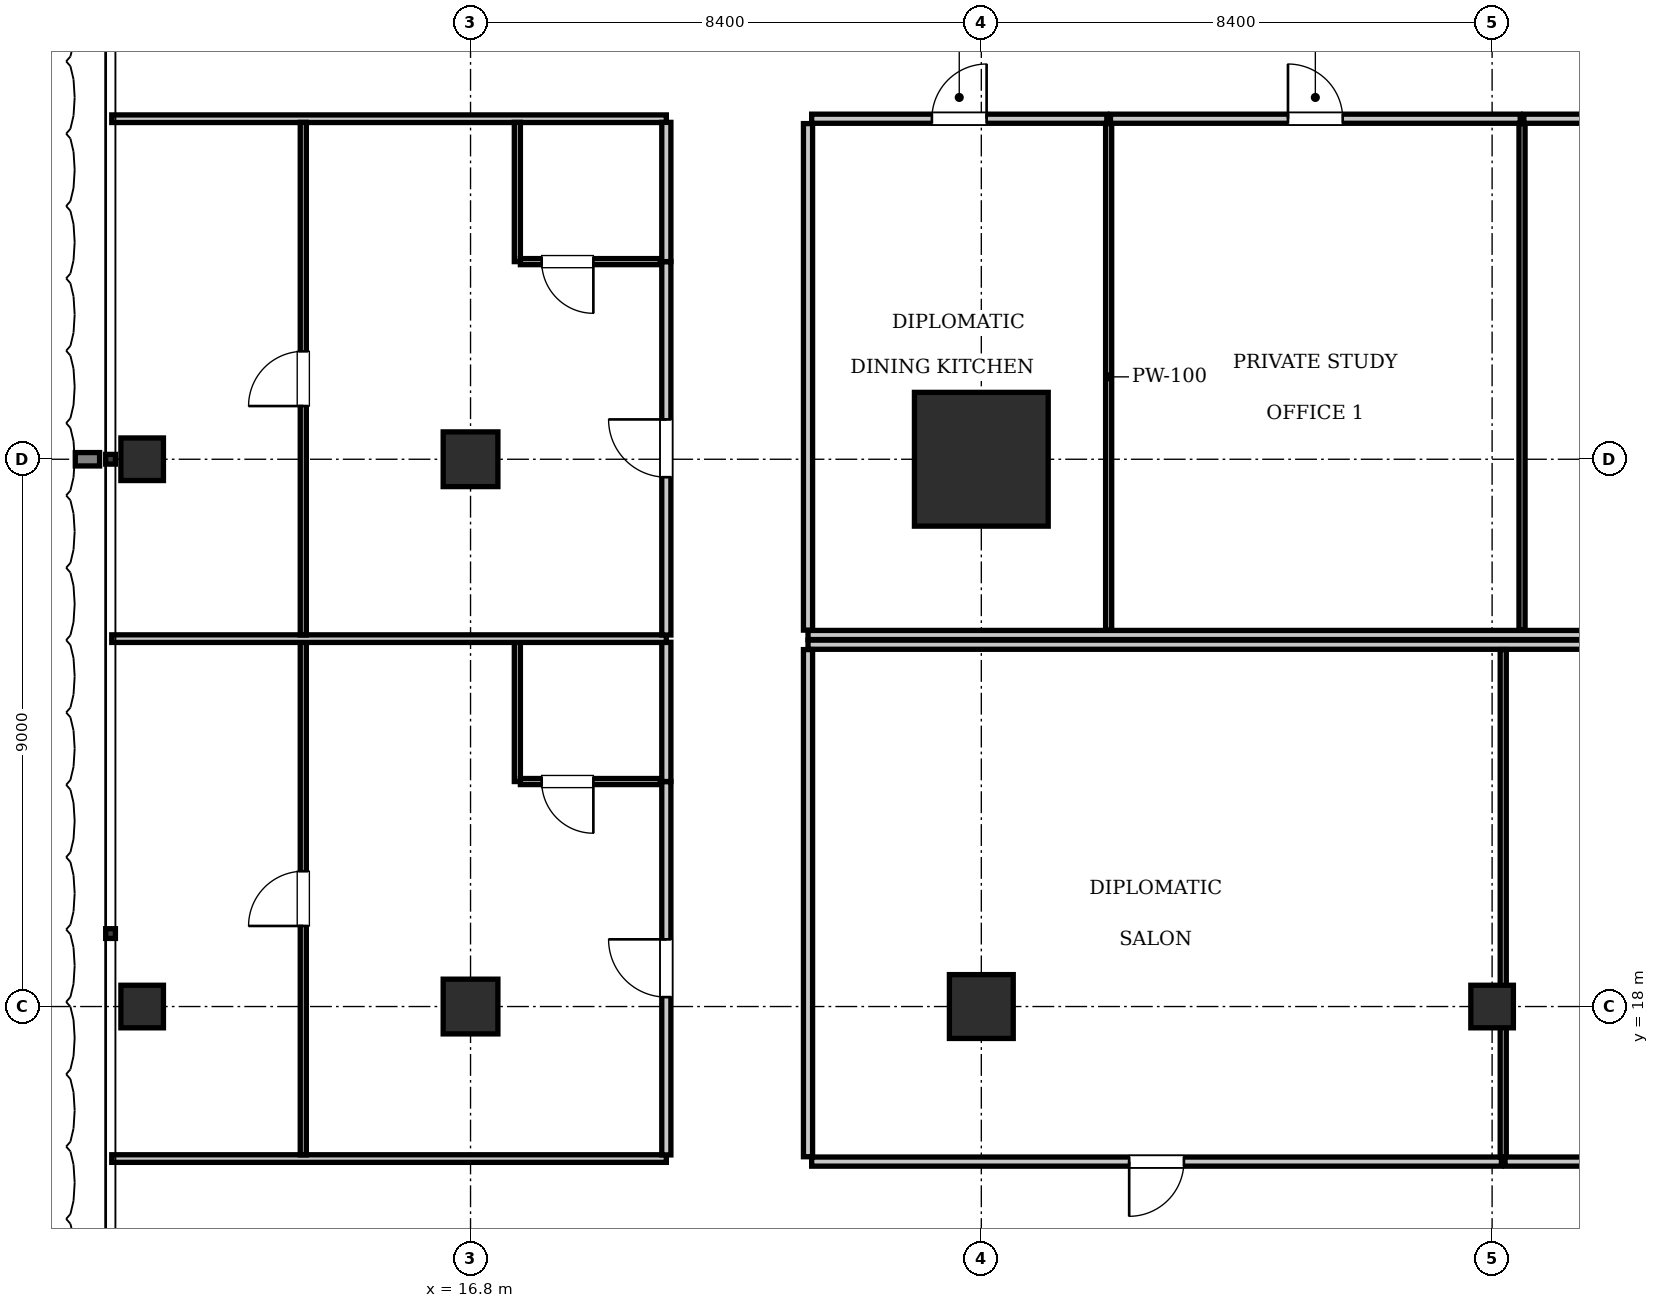
"""IFC4 building model, lengths in metres.
Left out: names, types, materials, properties, quantities, classifications, styles, units other than length and angle.
Written with IfcOpenShell. Run it as: python <this file> out.ifc"""

import sys

from ifc_helpers import new_model, si_unit, direction, frame, frame_2d, origin, origin_2d, place, context, subcontext, project, spatial, rectangle, i_section, extrude, element, fill, save


model = new_model("IFC4")
c1 = context("Model", 3, precision=1e-05, world=origin(), true_north=direction((0.0, 1.0)))
c2 = subcontext(c1, "Body", "Model", "MODEL_VIEW")
j1 = project(units=[si_unit("LENGTHUNIT", "METRE"), si_unit("PLANEANGLEUNIT", "RADIAN")], contexts=[c1])
p1 = place(None, origin())
s1 = spatial("IfcSite", under=j1, at=p1, CompositionType="ELEMENT")
p2 = place(p1, origin())
s2 = spatial("IfcBuilding", under=s1, at=p2, CompositionType="ELEMENT")
p3 = place(p2, frame((0.0, 0.0, 73.15)))
s3 = spatial("IfcBuildingStorey", under=s2, at=p3, CompositionType="ELEMENT", Elevation=73.15)
p4 = place(p3, frame((25.2, 27.0, 0.0), z_axis=(0.0, 0.0, 1.0), x_axis=(1.0, 0.0, 0.0)))
e1 = element("IfcColumn", 1, at=p4, inside=s3, PredefinedType="COLUMN", context=c2, shape_type="SweptSolid", body=[
    extrude(rectangle(XDim=2.2, YDim=2.2, at=origin_2d()), origin(), (0.0, 0.0, 1.0), 3.85),
])
p5 = place(p3, frame((25.2, 18.0, 0.0), z_axis=(0.0, 0.0, 1.0), x_axis=(1.0, 0.0, 0.0)))
e2 = element("IfcColumn", 2, at=p5, inside=s3, PredefinedType="COLUMN", context=c2, shape_type="SweptSolid", body=[
    extrude(rectangle(XDim=1.05, YDim=1.05, at=origin_2d()), origin(), (0.0, 0.0, 1.0), 3.85),
])
p6 = place(p3, frame((33.6, 18.0, 0.0), z_axis=(0.0, 0.0, 1.0), x_axis=(1.0, 0.0, 0.0)))
e3 = element("IfcColumn", 3, at=p6, inside=s3, PredefinedType="COLUMN", context=c2, shape_type="SweptSolid", body=[
    extrude(i_section(OverallWidth=0.7, OverallDepth=0.7, WebThickness=0.028, FlangeThickness=0.044, at=origin_2d()), origin(), (0.0, 0.0, 1.0), 3.85),
])
for number, where, z_axis, x_axis in (
    (4, (16.8, 18.0, 0.0), (0.0, 0.0, 1.0), (1.0, 0.0, 0.0)),
    (5, (16.8, 27.0, 0.0), (0.0, 0.0, 1.0), (1.0, 0.0, 0.0)),
):
    element("IfcColumn", number, at=place(p3, frame(where, z_axis=z_axis, x_axis=x_axis)), inside=s3, PredefinedType="COLUMN", context=c2, shape_type="SweptSolid", body=[
        extrude(rectangle(XDim=0.9, YDim=0.9, at=origin_2d()), origin(), (0.0, 0.0, 1.0), 3.85),
    ])
for number, where, z_axis, x_axis in (
    (6, (11.4, 18.0, 0.0), (0.0, 0.0, 1.0), (1.0, 0.0, 0.0)),
    (7, (11.4, 27.0, 0.0), (0.0, 0.0, 1.0), (1.0, 0.0, 0.0)),
):
    element("IfcColumn", number, at=place(p3, frame(where, z_axis=z_axis, x_axis=x_axis)), inside=s3, PredefinedType="COLUMN", context=c2, shape_type="SweptSolid", body=[
        extrude(i_section(OverallWidth=0.7, OverallDepth=0.7, WebThickness=0.028, FlangeThickness=0.044, at=origin_2d()), origin(), (0.0, 0.0, 1.0), 3.85),
    ])
p7 = place(p3, frame((22.35, 24.11, 0.0), z_axis=(0.0, 0.0, 1.0), x_axis=(1.0, 0.0, 0.0)))
e8 = element("IfcWall", 8, at=p7, inside=s3, PredefinedType="PARTITIONING", context=c2, shape_type="SweptSolid", body=[
    extrude(rectangle(XDim=30.9, YDim=0.15, at=frame_2d((15.45, 0.0))), origin(), (0.0, 0.0, 1.0), 3.61),
])
p8 = place(p3, frame((22.35, 24.19, 0.0), z_axis=(0.0, 0.0, 1.0), x_axis=(0.0, 1.0, 0.0)))
e9 = element("IfcWall", 9, at=p8, inside=s3, PredefinedType="PARTITIONING", context=c2, shape_type="SweptSolid", body=[
    extrude(rectangle(XDim=8.33, YDim=0.15, at=frame_2d((4.165, 0.0))), origin(), (0.0, 0.0, 1.0), 3.61),
])
p9 = place(p3, frame((22.41, 32.6, 0.0), z_axis=(0.0, 0.0, 1.0), x_axis=(1.0, 0.0, 0.0)))
e10 = element("IfcWall", 10, at=p9, inside=s3, PredefinedType="PARTITIONING", context=c2, shape_type="SweptSolid", body=[
    extrude(rectangle(XDim=4.854, YDim=0.15, at=frame_2d((2.427, 0.0))), origin(), (0.0, 0.0, 1.0), 3.61),
])
p10 = place(p9, frame((1.977, 0.0, 0.0)))
e11 = element("IfcOpeningElement", 11, at=p10, cuts=e10, PredefinedType="OPENING", context=c2, shape_type="SweptSolid", body=[
    extrude(rectangle(XDim=0.9, YDim=2.1, at=frame_2d((0.45, 1.05))), frame((0.0, 0.085, 0.0), z_axis=(0.0, -1.0, 0.0), x_axis=(1.0, 0.0, 0.0)), (0.0, 0.0, 1.0), 0.17),
])
p11 = place(p3, frame((27.294, 24.19, 0.0), z_axis=(0.0, 0.0, 1.0), x_axis=(0.0, 1.0, 0.0)))
e12 = element("IfcWall", 12, at=p11, inside=s3, PredefinedType="PARTITIONING", context=c2, shape_type="SweptSolid", body=[
    extrude(rectangle(XDim=8.33, YDim=0.1, at=frame_2d((4.165, 0.0))), origin(), (0.0, 0.0, 1.0), 3.61),
])
p12 = place(p3, frame((27.324, 32.6, 0.0), z_axis=(0.0, 0.0, 1.0), x_axis=(1.0, 0.0, 0.0)))
e13 = element("IfcWall", 13, at=p12, inside=s3, PredefinedType="PARTITIONING", context=c2, shape_type="SweptSolid", body=[
    extrude(rectangle(XDim=6.738, YDim=0.15, at=frame_2d((3.369, 0.0))), origin(), (0.0, 0.0, 1.0), 3.61),
])
p13 = place(p12, frame((2.919, 0.0, 0.0)))
e14 = element("IfcOpeningElement", 14, at=p13, cuts=e13, PredefinedType="OPENING", context=c2, shape_type="SweptSolid", body=[
    extrude(rectangle(XDim=0.9, YDim=2.1, at=frame_2d((0.45, 1.05))), frame((0.0, 0.085, 0.0), z_axis=(0.0, -1.0, 0.0), x_axis=(1.0, 0.0, 0.0)), (0.0, 0.0, 1.0), 0.17),
])
p14 = place(p3, frame((34.092, 24.19, 0.0), z_axis=(0.0, 0.0, 1.0), x_axis=(0.0, 1.0, 0.0)))
e15 = element("IfcWall", 15, at=p14, inside=s3, PredefinedType="PARTITIONING", context=c2, shape_type="SweptSolid", body=[
    extrude(rectangle(XDim=8.33, YDim=0.1, at=frame_2d((4.165, 0.0))), origin(), (0.0, 0.0, 1.0), 3.61),
])
p15 = place(p3, frame((34.122, 32.6, 0.0), z_axis=(0.0, 0.0, 1.0), x_axis=(1.0, 0.0, 0.0)))
e16 = element("IfcWall", 16, at=p15, inside=s3, PredefinedType="PARTITIONING", context=c2, shape_type="SweptSolid", body=[
    extrude(rectangle(XDim=8.592, YDim=0.15, at=frame_2d((4.296, 0.0))), origin(), (0.0, 0.0, 1.0), 3.61),
])
p16 = place(p15, frame((3.846, 0.0, 0.0)))
e17 = element("IfcOpeningElement", 17, at=p16, cuts=e16, PredefinedType="OPENING", context=c2, shape_type="SweptSolid", body=[
    extrude(rectangle(XDim=0.9, YDim=2.1, at=frame_2d((0.45, 1.05))), frame((0.0, 0.085, 0.0), z_axis=(0.0, -1.0, 0.0), x_axis=(1.0, 0.0, 0.0)), (0.0, 0.0, 1.0), 0.17),
])
p17 = place(p3, frame((22.35, 23.95, 0.0), z_axis=(0.0, 0.0, 1.0), x_axis=(1.0, 0.0, 0.0)))
e18 = element("IfcWall", 18, at=p17, inside=s3, PredefinedType="PARTITIONING", context=c2, shape_type="SweptSolid", body=[
    extrude(rectangle(XDim=30.9, YDim=0.15, at=frame_2d((15.45, 0.0))), origin(), (0.0, 0.0, 1.0), 3.61),
])
p18 = place(p3, frame((22.35, 15.53, 0.0), z_axis=(0.0, 0.0, 1.0), x_axis=(0.0, 1.0, 0.0)))
e19 = element("IfcWall", 19, at=p18, inside=s3, PredefinedType="PARTITIONING", context=c2, shape_type="SweptSolid", body=[
    extrude(rectangle(XDim=8.34, YDim=0.15, at=frame_2d((4.17, 0.0))), origin(), (0.0, 0.0, 1.0), 3.61),
])
p19 = place(p3, frame((22.41, 15.45, 0.0), z_axis=(0.0, 0.0, 1.0), x_axis=(1.0, 0.0, 0.0)))
e20 = element("IfcWall", 20, at=p19, inside=s3, PredefinedType="PARTITIONING", context=c2, shape_type="SweptSolid", body=[
    extrude(rectangle(XDim=11.343, YDim=0.15, at=frame_2d((5.671, 0.0))), origin(), (0.0, 0.0, 1.0), 3.61),
])
p20 = place(p19, frame((5.221, 0.0, 0.0)))
e21 = element("IfcOpeningElement", 21, at=p20, cuts=e20, PredefinedType="OPENING", context=c2, shape_type="SweptSolid", body=[
    extrude(rectangle(XDim=0.9, YDim=2.1, at=frame_2d((0.45, 1.05))), frame((0.0, 0.085, 0.0), z_axis=(0.0, -1.0, 0.0), x_axis=(1.0, 0.0, 0.0)), (0.0, 0.0, 1.0), 0.17),
])
p21 = place(p3, frame((33.783, 15.53, 0.0), z_axis=(0.0, 0.0, 1.0), x_axis=(0.0, 1.0, 0.0)))
e22 = element("IfcWall", 22, at=p21, inside=s3, PredefinedType="PARTITIONING", context=c2, shape_type="SweptSolid", body=[
    extrude(rectangle(XDim=8.34, YDim=0.1, at=frame_2d((4.17, 0.0))), origin(), (0.0, 0.0, 1.0), 2.999),
])
p22 = place(p3, frame((33.813, 15.45, 0.0), z_axis=(0.0, 0.0, 1.0), x_axis=(1.0, 0.0, 0.0)))
e23 = element("IfcWall", 23, at=p22, inside=s3, PredefinedType="PARTITIONING", context=c2, shape_type="SweptSolid", body=[
    extrude(rectangle(XDim=19.377, YDim=0.15, at=frame_2d((9.688, 0.0))), origin(), (0.0, 0.0, 1.0), 3.61),
])
p23 = place(p22, frame((9.239, 0.0, 0.0)))
e24 = element("IfcOpeningElement", 24, at=p23, cuts=e23, PredefinedType="OPENING", context=c2, shape_type="SweptSolid", body=[
    extrude(rectangle(XDim=0.9, YDim=2.1, at=frame_2d((0.45, 1.05))), frame((0.0, 0.085, 0.0), z_axis=(0.0, -1.0, 0.0), x_axis=(1.0, 0.0, 0.0)), (0.0, 0.0, 1.0), 0.17),
])
for number, where, z_axis, x_axis in (
    (25, (10.9, 15.5, 0.0), (0.0, 0.0, 1.0), (1.0, 0.0, 0.0)),
    (26, (10.9, 32.6, 0.0), (0.0, 0.0, 1.0), (1.0, 0.0, 0.0)),
):
    element("IfcWall", number, at=place(p3, frame(where, z_axis=z_axis, x_axis=x_axis)), inside=s3, PredefinedType="PARTITIONING", context=c2, shape_type="SweptSolid", body=[
        extrude(rectangle(XDim=9.12, YDim=0.125, at=frame_2d((4.56, 0.0))), origin(), (0.0, 0.0, 1.0), 3.61),
    ])
p24 = place(p3, frame((20.02, 15.56, 0.0), z_axis=(0.0, 0.0, 1.0), x_axis=(0.0, 1.0, 0.0)))
e27 = element("IfcWall", 27, at=p24, inside=s3, PredefinedType="PARTITIONING", context=c2, shape_type="SweptSolid", body=[
    extrude(rectangle(XDim=6.14, YDim=0.15, at=frame_2d((3.07, 0.0))), origin(), (0.0, 0.0, 1.0), 3.61),
])
p25 = place(p24, frame((2.595, 0.0, 0.0)))
e28 = element("IfcOpeningElement", 28, at=p25, cuts=e27, PredefinedType="OPENING", context=c2, shape_type="SweptSolid", body=[
    extrude(rectangle(XDim=0.95, YDim=2.15, at=frame_2d((0.475, 1.075))), frame((0.0, 0.085, 0.0), z_axis=(0.0, -1.0, 0.0), x_axis=(1.0, 0.0, 0.0)), (0.0, 0.0, 1.0), 0.17),
])
p26 = place(p3, frame((20.02, 21.7, 0.0), z_axis=(0.0, 0.0, 1.0), x_axis=(0.0, 1.0, 0.0)))
e29 = element("IfcWall", 29, at=p26, inside=s3, PredefinedType="PARTITIONING", context=c2, shape_type="SweptSolid", body=[
    extrude(rectangle(XDim=2.29, YDim=0.15, at=frame_2d((1.145, 0.0))), origin(), (0.0, 0.0, 1.0), 3.61),
])
p27 = place(p3, frame((17.57, 21.7, 0.0), z_axis=(0.0, 0.0, 1.0), x_axis=(0.0, 1.0, 0.0)))
e30 = element("IfcWall", 30, at=p27, inside=s3, PredefinedType="PARTITIONING", context=c2, shape_type="SweptSolid", body=[
    extrude(rectangle(XDim=2.29, YDim=0.1, at=frame_2d((1.145, 0.0))), origin(), (0.0, 0.0, 1.0), 3.61),
])
p28 = place(p3, frame((17.62, 21.7, 0.0), z_axis=(0.0, 0.0, 1.0), x_axis=(1.0, 0.0, 0.0)))
e31 = element("IfcWall", 31, at=p28, inside=s3, PredefinedType="PARTITIONING", context=c2, shape_type="SweptSolid", body=[
    extrude(rectangle(XDim=2.3, YDim=0.1, at=frame_2d((1.15, 0.0))), origin(), (0.0, 0.0, 1.0), 3.61),
])
p29 = place(p28, frame((0.35, 0.0, 0.0)))
e32 = element("IfcOpeningElement", 32, at=p29, cuts=e31, PredefinedType="OPENING", context=c2, shape_type="SweptSolid", body=[
    extrude(rectangle(XDim=0.85, YDim=2.1, at=frame_2d((0.425, 1.05))), frame((0.0, 0.06, 0.0), z_axis=(0.0, -1.0, 0.0), x_axis=(1.0, 0.0, 0.0)), (0.0, 0.0, 1.0), 0.12),
])
p30 = place(p3, frame((14.05, 15.56, 0.0), z_axis=(0.0, 0.0, 1.0), x_axis=(0.0, 1.0, 0.0)))
e33 = element("IfcWall", 33, at=p30, inside=s3, PredefinedType="PARTITIONING", context=c2, shape_type="SweptSolid", body=[
    extrude(rectangle(XDim=8.43, YDim=0.1, at=frame_2d((4.215, 0.0))), origin(), (0.0, 0.0, 1.0), 3.207),
])
p31 = place(p30, frame((3.765, 0.0, 0.0)))
e34 = element("IfcOpeningElement", 34, at=p31, cuts=e33, PredefinedType="OPENING", context=c2, shape_type="SweptSolid", body=[
    extrude(rectangle(XDim=0.9, YDim=2.1, at=frame_2d((0.45, 1.05))), frame((0.0, 0.06, 0.0), z_axis=(0.0, -1.0, 0.0), x_axis=(1.0, 0.0, 0.0)), (0.0, 0.0, 1.0), 0.12),
])
p32 = place(p3, frame((10.9, 24.05, 0.0), z_axis=(0.0, 0.0, 1.0), x_axis=(1.0, 0.0, 0.0)))
e35 = element("IfcWall", 35, at=p32, inside=s3, PredefinedType="PARTITIONING", context=c2, shape_type="SweptSolid", body=[
    extrude(rectangle(XDim=9.12, YDim=0.125, at=frame_2d((4.56, 0.0))), origin(), (0.0, 0.0, 1.0), 3.61),
])
p33 = place(p3, frame((20.02, 24.11, 0.0), z_axis=(0.0, 0.0, 1.0), x_axis=(0.0, 1.0, 0.0)))
e36 = element("IfcWall", 36, at=p33, inside=s3, PredefinedType="PARTITIONING", context=c2, shape_type="SweptSolid", body=[
    extrude(rectangle(XDim=6.14, YDim=0.15, at=frame_2d((3.07, 0.0))), origin(), (0.0, 0.0, 1.0), 3.61),
])
p34 = place(p33, frame((2.595, 0.0, 0.0)))
e37 = element("IfcOpeningElement", 37, at=p34, cuts=e36, PredefinedType="OPENING", context=c2, shape_type="SweptSolid", body=[
    extrude(rectangle(XDim=0.95, YDim=2.15, at=frame_2d((0.475, 1.075))), frame((0.0, 0.085, 0.0), z_axis=(0.0, -1.0, 0.0), x_axis=(1.0, 0.0, 0.0)), (0.0, 0.0, 1.0), 0.17),
])
p35 = place(p3, frame((20.02, 30.25, 0.0), z_axis=(0.0, 0.0, 1.0), x_axis=(0.0, 1.0, 0.0)))
e38 = element("IfcWall", 38, at=p35, inside=s3, PredefinedType="PARTITIONING", context=c2, shape_type="SweptSolid", body=[
    extrude(rectangle(XDim=2.29, YDim=0.15, at=frame_2d((1.145, 0.0))), origin(), (0.0, 0.0, 1.0), 3.61),
])
p36 = place(p3, frame((17.57, 30.25, 0.0), z_axis=(0.0, 0.0, 1.0), x_axis=(0.0, 1.0, 0.0)))
e39 = element("IfcWall", 39, at=p36, inside=s3, PredefinedType="PARTITIONING", context=c2, shape_type="SweptSolid", body=[
    extrude(rectangle(XDim=2.29, YDim=0.1, at=frame_2d((1.145, 0.0))), origin(), (0.0, 0.0, 1.0), 3.61),
])
p37 = place(p3, frame((17.62, 30.25, 0.0), z_axis=(0.0, 0.0, 1.0), x_axis=(1.0, 0.0, 0.0)))
e40 = element("IfcWall", 40, at=p37, inside=s3, PredefinedType="PARTITIONING", context=c2, shape_type="SweptSolid", body=[
    extrude(rectangle(XDim=2.3, YDim=0.1, at=frame_2d((1.15, 0.0))), origin(), (0.0, 0.0, 1.0), 3.61),
])
p38 = place(p37, frame((0.35, 0.0, 0.0)))
e41 = element("IfcOpeningElement", 41, at=p38, cuts=e40, PredefinedType="OPENING", context=c2, shape_type="SweptSolid", body=[
    extrude(rectangle(XDim=0.85, YDim=2.1, at=frame_2d((0.425, 1.05))), frame((0.0, 0.06, 0.0), z_axis=(0.0, -1.0, 0.0), x_axis=(1.0, 0.0, 0.0)), (0.0, 0.0, 1.0), 0.12),
])
p39 = place(p3, frame((14.05, 24.11, 0.0), z_axis=(0.0, 0.0, 1.0), x_axis=(0.0, 1.0, 0.0)))
e42 = element("IfcWall", 42, at=p39, inside=s3, PredefinedType="PARTITIONING", context=c2, shape_type="SweptSolid", body=[
    extrude(rectangle(XDim=8.43, YDim=0.1, at=frame_2d((4.215, 0.0))), origin(), (0.0, 0.0, 1.0), 3.207),
])
p40 = place(p39, frame((3.765, 0.0, 0.0)))
e43 = element("IfcOpeningElement", 43, at=p40, cuts=e42, PredefinedType="OPENING", context=c2, shape_type="SweptSolid", body=[
    extrude(rectangle(XDim=0.9, YDim=2.1, at=frame_2d((0.45, 1.05))), frame((0.0, 0.06, 0.0), z_axis=(0.0, -1.0, 0.0), x_axis=(1.0, 0.0, 0.0)), (0.0, 0.0, 1.0), 0.12),
])
p41 = place(p10, origin())
e44 = element("IfcDoor", 44, at=p41, inside=s3, OperationType="SINGLE_SWING_RIGHT", PredefinedType="DOOR", context=c2, shape_type="SweptSolid", body=[
    extrude(rectangle(XDim=0.9, YDim=2.1, at=frame_2d((0.45, 1.05))), frame((0.0, 0.025, 0.0), z_axis=(0.0, -1.0, 0.0), x_axis=(1.0, 0.0, 0.0)), (0.0, 0.0, 1.0), 0.05),
])
fill(e11, e44)
p42 = place(p13, origin())
e45 = element("IfcDoor", 45, at=p42, inside=s3, OperationType="SINGLE_SWING_LEFT", PredefinedType="DOOR", context=c2, shape_type="SweptSolid", body=[
    extrude(rectangle(XDim=0.9, YDim=2.1, at=frame_2d((0.45, 1.05))), frame((0.0, 0.025, 0.0), z_axis=(0.0, -1.0, 0.0), x_axis=(1.0, 0.0, 0.0)), (0.0, 0.0, 1.0), 0.05),
])
fill(e14, e45)
p43 = place(p20, frame((0.9, 0.0, 0.0), z_axis=(0.0, 0.0, 1.0), x_axis=(-1.0, 0.0, 0.0)))
e46 = element("IfcDoor", 46, at=p43, inside=s3, OperationType="SINGLE_SWING_RIGHT", PredefinedType="DOOR", context=c2, shape_type="SweptSolid", body=[
    extrude(rectangle(XDim=0.9, YDim=2.1, at=frame_2d((0.45, 1.05))), frame((0.0, 0.025, 0.0), z_axis=(0.0, -1.0, 0.0), x_axis=(1.0, 0.0, 0.0)), (0.0, 0.0, 1.0), 0.05),
])
fill(e21, e46)
p44 = place(p29, frame((0.85, 0.0, 0.0), z_axis=(0.0, 0.0, 1.0), x_axis=(-1.0, 0.0, 0.0)))
e47 = element("IfcDoor", 47, at=p44, inside=s3, OperationType="SINGLE_SWING_LEFT", PredefinedType="DOOR", context=c2, shape_type="SweptSolid", body=[
    extrude(rectangle(XDim=0.85, YDim=2.1, at=frame_2d((0.425, 1.05))), frame((0.0, 0.025, 0.0), z_axis=(0.0, -1.0, 0.0), x_axis=(1.0, 0.0, 0.0)), (0.0, 0.0, 1.0), 0.05),
])
fill(e32, e47)
p45 = place(p25, origin())
e48 = element("IfcDoor", 48, at=p45, inside=s3, OperationType="SINGLE_SWING_RIGHT", PredefinedType="DOOR", context=c2, shape_type="SweptSolid", body=[
    extrude(rectangle(XDim=0.95, YDim=2.15, at=frame_2d((0.475, 1.075))), frame((0.0, 0.025, 0.0), z_axis=(0.0, -1.0, 0.0), x_axis=(1.0, 0.0, 0.0)), (0.0, 0.0, 1.0), 0.05),
])
fill(e28, e48)
p46 = place(p31, origin())
e49 = element("IfcDoor", 49, at=p46, inside=s3, OperationType="SINGLE_SWING_LEFT", PredefinedType="DOOR", context=c2, shape_type="SweptSolid", body=[
    extrude(rectangle(XDim=0.9, YDim=2.1, at=frame_2d((0.45, 1.05))), frame((0.0, 0.025, 0.0), z_axis=(0.0, -1.0, 0.0), x_axis=(1.0, 0.0, 0.0)), (0.0, 0.0, 1.0), 0.05),
])
fill(e34, e49)
p47 = place(p38, frame((0.85, 0.0, 0.0), z_axis=(0.0, 0.0, 1.0), x_axis=(-1.0, 0.0, 0.0)))
e50 = element("IfcDoor", 50, at=p47, inside=s3, OperationType="SINGLE_SWING_LEFT", PredefinedType="DOOR", context=c2, shape_type="SweptSolid", body=[
    extrude(rectangle(XDim=0.85, YDim=2.1, at=frame_2d((0.425, 1.05))), frame((0.0, 0.025, 0.0), z_axis=(0.0, -1.0, 0.0), x_axis=(1.0, 0.0, 0.0)), (0.0, 0.0, 1.0), 0.05),
])
fill(e41, e50)
p48 = place(p34, origin())
e51 = element("IfcDoor", 51, at=p48, inside=s3, OperationType="SINGLE_SWING_RIGHT", PredefinedType="DOOR", context=c2, shape_type="SweptSolid", body=[
    extrude(rectangle(XDim=0.95, YDim=2.15, at=frame_2d((0.475, 1.075))), frame((0.0, 0.025, 0.0), z_axis=(0.0, -1.0, 0.0), x_axis=(1.0, 0.0, 0.0)), (0.0, 0.0, 1.0), 0.05),
])
fill(e37, e51)
p49 = place(p40, origin())
e52 = element("IfcDoor", 52, at=p49, inside=s3, OperationType="SINGLE_SWING_LEFT", PredefinedType="DOOR", context=c2, shape_type="SweptSolid", body=[
    extrude(rectangle(XDim=0.9, YDim=2.1, at=frame_2d((0.45, 1.05))), frame((0.0, 0.025, 0.0), z_axis=(0.0, -1.0, 0.0), x_axis=(1.0, 0.0, 0.0)), (0.0, 0.0, 1.0), 0.05),
])
fill(e43, e52)
save(model, sys.argv[1])
